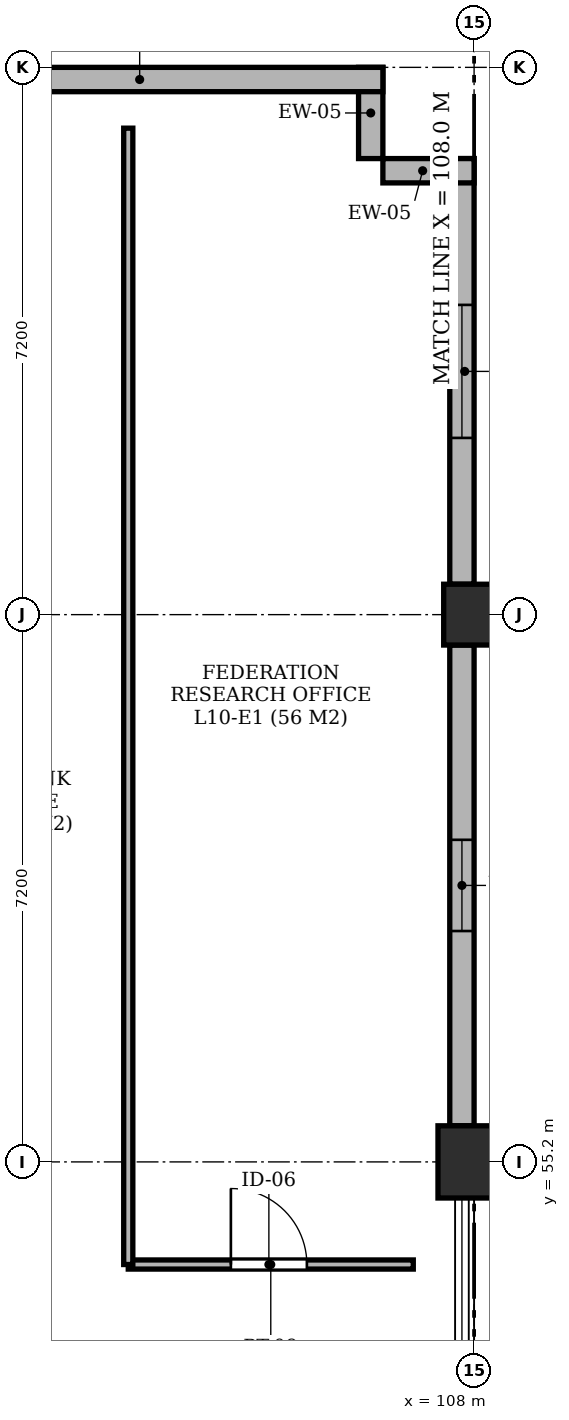
"""IFC4 building model, lengths in metres.
Left out: names, types, materials, properties, quantities, classifications, styles, units other than length and angle.
Written with IfcOpenShell. Run it as: python <this file> out.ifc"""

import sys

from ifc_helpers import new_model, si_unit, direction, frame, frame_2d, origin, origin_2d, place, context, subcontext, project, spatial, rectangle, extrude, element, fill, save


model = new_model("IFC4")
c1 = context("Model", 3, precision=1e-05, world=origin(), true_north=direction((0.0, 1.0)))
c2 = subcontext(c1, "Body", "Model", "MODEL_VIEW")
j1 = project(units=[si_unit("LENGTHUNIT", "METRE"), si_unit("PLANEANGLEUNIT", "RADIAN")], contexts=[c1])
p1 = place(None, origin())
s1 = spatial("IfcSite", under=j1, at=p1, CompositionType="ELEMENT")
p2 = place(p1, origin())
s2 = spatial("IfcBuilding", under=s1, at=p2, CompositionType="ELEMENT")
p3 = place(p2, frame((0.0, 0.0, 43.8)))
s3 = spatial("IfcBuildingStorey", under=s2, at=p3, CompositionType="ELEMENT", Elevation=43.8)
p4 = place(p3, frame((108.0, 55.2, -0.24), z_axis=(0.0, 0.0, 1.0), x_axis=(1.0, 0.0, 0.0)))
e1 = element("IfcColumn", 1, at=p4, inside=s3, PredefinedType="COLUMN", context=c2, shape_type="SweptSolid", body=[
    extrude(rectangle(XDim=0.95, YDim=0.95, at=origin_2d()), origin(), (0.0, 0.0, 1.0), 3.26),
])
p5 = place(p3, frame((108.0, 62.4, -0.24), z_axis=(0.0, 0.0, 1.0), x_axis=(1.0, 0.0, 0.0)))
e2 = element("IfcColumn", 2, at=p5, inside=s3, PredefinedType="COLUMN", context=c2, shape_type="SweptSolid", body=[
    extrude(rectangle(XDim=0.8, YDim=0.8, at=origin_2d()), origin(), (0.0, 0.0, 1.0), 3.26),
])
p6 = place(p3, frame((107.84, 55.675, 0.0), z_axis=(0.0, 0.0, 1.0), x_axis=(0.0, 1.0, 0.0)))
e3 = element("IfcWall", 3, at=p6, inside=s3, PredefinedType="SOLIDWALL", context=c2, shape_type="SweptSolid", body=[
    extrude(rectangle(XDim=6.325, YDim=0.32, at=frame_2d((3.163, 0.0))), origin(), (0.0, 0.0, 1.0), 2.53),
])
p7 = place(p6, frame((2.562, 0.0, 0.62)))
e4 = element("IfcOpeningElement", 4, at=p7, cuts=e3, PredefinedType="OPENING", context=c2, shape_type="SweptSolid", body=[
    extrude(rectangle(XDim=1.2, YDim=1.7, at=frame_2d((0.6, 0.85))), frame((0.0, 0.172, 0.0), z_axis=(0.0, -1.0, 0.0), x_axis=(1.0, 0.0, 0.0)), (0.0, 0.0, 1.0), 0.344),
])
p8 = place(p3, frame((107.84, 62.8, 0.0), z_axis=(0.0, 0.0, 1.0), x_axis=(0.0, 1.0, 0.0)))
e5 = element("IfcWall", 5, at=p8, inside=s3, PredefinedType="SOLIDWALL", context=c2, shape_type="SweptSolid", body=[
    extrude(rectangle(XDim=5.6, YDim=0.32, at=frame_2d((2.8, 0.0))), origin(), (0.0, 0.0, 1.0), 2.53),
])
p9 = place(p8, frame((1.925, 0.0, 0.62)))
e6 = element("IfcOpeningElement", 6, at=p9, cuts=e5, PredefinedType="OPENING", context=c2, shape_type="SweptSolid", body=[
    extrude(rectangle(XDim=1.75, YDim=1.81, at=frame_2d((0.875, 0.905))), frame((0.0, 0.172, 0.0), z_axis=(0.0, -1.0, 0.0), x_axis=(1.0, 0.0, 0.0)), (0.0, 0.0, 1.0), 0.344),
])
p10 = place(p3, frame((108.0, 68.24, 0.0), z_axis=(0.0, 0.0, 1.0), x_axis=(-1.0, 0.0, 0.0)))
e7 = element("IfcWall", 7, at=p10, inside=s3, PredefinedType="SOLIDWALL", context=c2, shape_type="SweptSolid", body=[
    extrude(rectangle(XDim=1.2, YDim=0.32, at=frame_2d((0.6, 0.0))), origin(), (0.0, 0.0, 1.0), 2.53),
])
p11 = place(p3, frame((106.64, 68.4, 0.0), z_axis=(0.0, 0.0, 1.0), x_axis=(0.0, 1.0, 0.0)))
e8 = element("IfcWall", 8, at=p11, inside=s3, PredefinedType="SOLIDWALL", context=c2, shape_type="SweptSolid", body=[
    extrude(rectangle(XDim=1.2, YDim=0.32, at=frame_2d((0.6, 0.0))), origin(), (0.0, 0.0, 1.0), 2.53),
])
p12 = place(p3, frame((106.8, 69.44, 0.0), z_axis=(0.0, 0.0, 1.0), x_axis=(-1.0, 0.0, 0.0)))
e9 = element("IfcWall", 9, at=p12, inside=s3, PredefinedType="SOLIDWALL", context=c2, shape_type="SweptSolid", body=[
    extrude(rectangle(XDim=6.4, YDim=0.32, at=frame_2d((3.2, 0.0))), origin(), (0.0, 0.0, 1.0), 2.53),
])
p13 = place(p12, frame((4.75, 0.0, 0.62)))
e10 = element("IfcOpeningElement", 10, at=p13, cuts=e9, PredefinedType="OPENING", context=c2, shape_type="SweptSolid", body=[
    extrude(rectangle(XDim=1.2, YDim=1.65, at=frame_2d((0.6, 0.825))), frame((0.0, 0.172, 0.0), z_axis=(0.0, -1.0, 0.0), x_axis=(1.0, 0.0, 0.0)), (0.0, 0.0, 1.0), 0.344),
])
p14 = place(p3, frame((103.45, 53.85, 0.0), z_axis=(0.0, 0.0, 1.0), x_axis=(1.0, 0.0, 0.0)))
e11 = element("IfcWall", 11, at=p14, inside=s3, PredefinedType="PARTITIONING", context=c2, shape_type="SweptSolid", body=[
    extrude(rectangle(XDim=3.75, YDim=0.12, at=frame_2d((1.875, 0.0))), origin(), (0.0, 0.0, 1.0), 2.53),
])
p15 = place(p14, frame((1.35, 0.0, 0.0)))
e12 = element("IfcOpeningElement", 12, at=p15, cuts=e11, PredefinedType="OPENING", context=c2, shape_type="SweptSolid", body=[
    extrude(rectangle(XDim=1.0, YDim=2.15, at=frame_2d((0.5, 1.075))), frame((0.0, 0.072, 0.0), z_axis=(0.0, -1.0, 0.0), x_axis=(1.0, 0.0, 0.0)), (0.0, 0.0, 1.0), 0.144),
])
p16 = place(p3, frame((103.45, 53.85, 0.0), z_axis=(0.0, 0.0, 1.0), x_axis=(0.0, 1.0, 0.0)))
e13 = element("IfcWall", 13, at=p16, inside=s3, PredefinedType="PARTITIONING", context=c2, shape_type="SweptSolid", body=[
    extrude(rectangle(XDim=14.95, YDim=0.12, at=frame_2d((7.475, 0.0))), origin(), (0.0, 0.0, 1.0), 2.53),
])
p17 = place(p7, origin())
e14 = element("IfcWindow", 14, at=p17, inside=s3, PartitioningType="SINGLE_PANEL", PredefinedType="WINDOW", context=c2, shape_type="SweptSolid", body=[
    extrude(rectangle(XDim=1.2, YDim=1.7, at=frame_2d((0.6, 0.85))), frame((0.0, 0.03, 0.0), z_axis=(0.0, -1.0, 0.0), x_axis=(1.0, 0.0, 0.0)), (0.0, 0.0, 1.0), 0.06),
])
fill(e4, e14)
p18 = place(p9, origin())
e15 = element("IfcWindow", 15, at=p18, inside=s3, PartitioningType="SINGLE_PANEL", PredefinedType="WINDOW", context=c2, shape_type="SweptSolid", body=[
    extrude(rectangle(XDim=1.75, YDim=1.81, at=frame_2d((0.875, 0.905))), frame((0.0, 0.03, 0.0), z_axis=(0.0, -1.0, 0.0), x_axis=(1.0, 0.0, 0.0)), (0.0, 0.0, 1.0), 0.06),
])
fill(e6, e15)
p19 = place(p15, origin())
e16 = element("IfcDoor", 16, at=p19, inside=s3, OperationType="SINGLE_SWING_LEFT", PredefinedType="DOOR", context=c2, shape_type="SweptSolid", body=[
    extrude(rectangle(XDim=1.0, YDim=2.15, at=frame_2d((0.5, 1.075))), frame((0.0, 0.025, 0.0), z_axis=(0.0, -1.0, 0.0), x_axis=(1.0, 0.0, 0.0)), (0.0, 0.0, 1.0), 0.05),
])
fill(e12, e16)
save(model, sys.argv[1])
